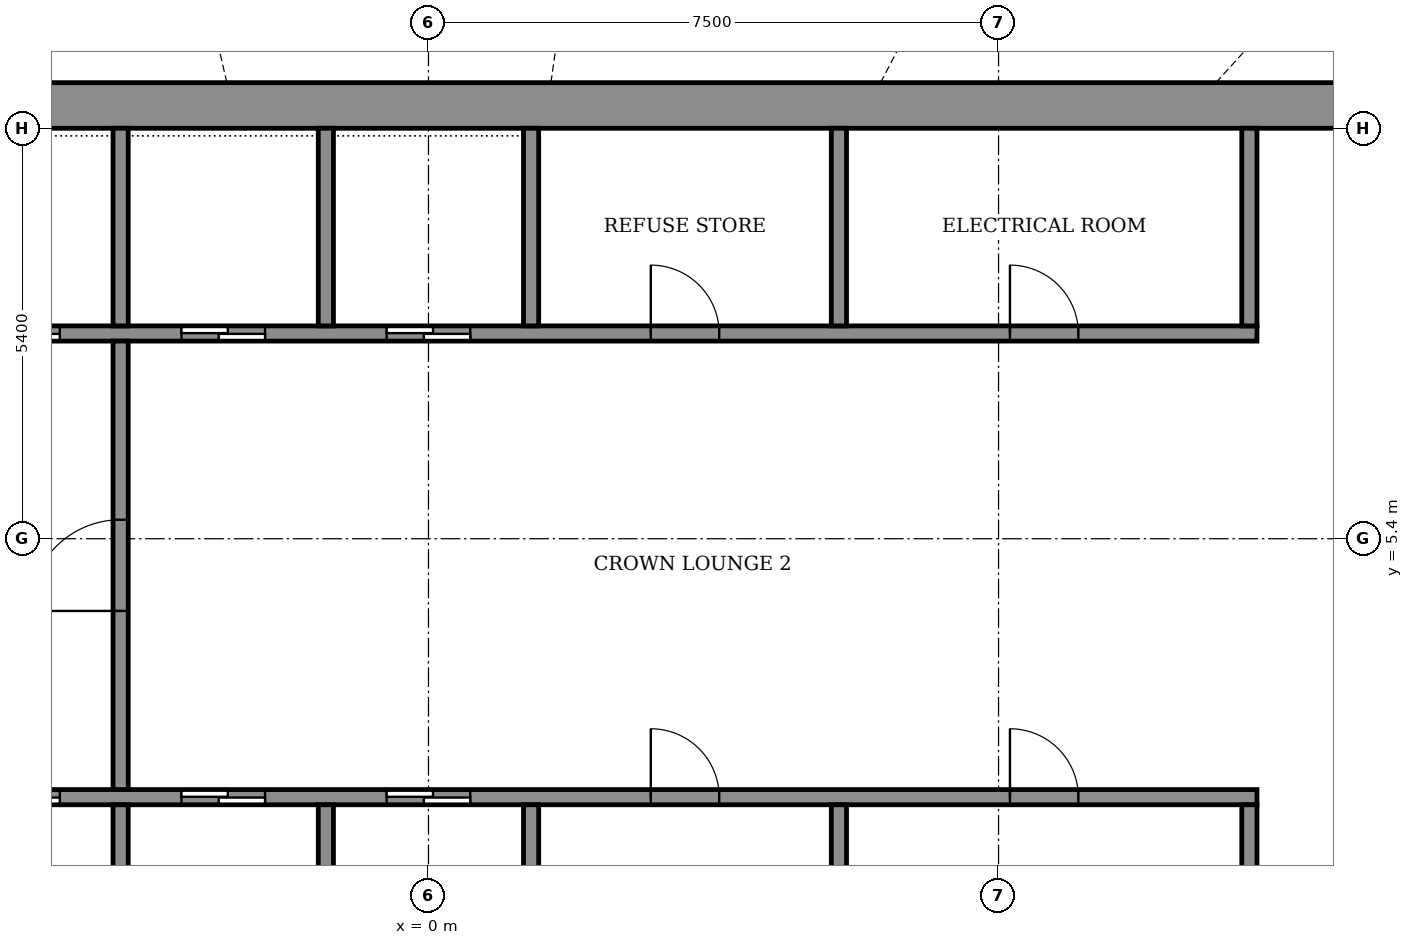
"""IFC4 building model, lengths in metres.
Left out: names, types, materials, properties, quantities, classifications, styles, units other than length and angle.
Written with IfcOpenShell. Run it as: python <this file> out.ifc"""

import sys

from ifc_helpers import new_model, si_unit, direction, frame, frame_2d, origin, place, context, subcontext, project, spatial, rectangle, extrude, element, fill, save


model = new_model("IFC4")
c1 = context("Model", 3, precision=1e-05, world=origin(), true_north=direction((0.0, 1.0)))
c2 = subcontext(c1, "Body", "Model", "MODEL_VIEW")
j1 = project(units=[si_unit("LENGTHUNIT", "METRE"), si_unit("PLANEANGLEUNIT", "RADIAN")], contexts=[c1])
p1 = place(None, origin())
s1 = spatial("IfcSite", under=j1, at=p1, CompositionType="ELEMENT")
p2 = place(p1, origin())
s2 = spatial("IfcBuilding", under=s1, at=p2, CompositionType="ELEMENT")
p3 = place(p2, frame((0.0, 0.0, 346.1)))
s3 = spatial("IfcBuildingStorey", under=s2, at=p3, CompositionType="ELEMENT", Elevation=346.1)
p4 = place(p3, frame((-14.4, 11.1, 0.0), z_axis=(0.0, 0.0, 1.0), x_axis=(1.0, 0.0, 0.0)))
e1 = element("IfcWall", 1, at=p4, inside=s3, PredefinedType="SHEAR", context=c2, shape_type="SweptSolid", body=[
    extrude(rectangle(XDim=28.8, YDim=0.6, at=frame_2d((14.4, 0.0))), origin(), (0.0, 0.0, 1.0), 4.6),
])
p5 = place(p3, frame((-10.9, 2.0, 0.0), z_axis=(0.0, 0.0, 1.0), x_axis=(1.0, 0.0, 0.0)))
e2 = element("IfcWall", 2, at=p5, inside=s3, PredefinedType="SHEAR", context=c2, shape_type="SweptSolid", body=[
    extrude(rectangle(XDim=21.8, YDim=0.2, at=frame_2d((10.9, 0.0))), origin(), (0.0, 0.0, 1.0), 4.05),
])
p6 = place(p5, frame((4.95, 0.0, 0.0)))
e3 = element("IfcOpeningElement", 3, at=p6, cuts=e2, PredefinedType="OPENING", context=c2, shape_type="SweptSolid", body=[
    extrude(rectangle(XDim=1.1, YDim=2.1, at=frame_2d((0.55, 1.05))), frame((0.0, 0.11, 0.0), z_axis=(0.0, -1.0, 0.0), x_axis=(1.0, 0.0, 0.0)), (0.0, 0.0, 1.0), 0.22),
])
p7 = place(p5, frame((7.65, 0.0, 0.0)))
e4 = element("IfcOpeningElement", 4, at=p7, cuts=e2, PredefinedType="OPENING", context=c2, shape_type="SweptSolid", body=[
    extrude(rectangle(XDim=1.1, YDim=2.1, at=frame_2d((0.55, 1.05))), frame((0.0, 0.11, 0.0), z_axis=(0.0, -1.0, 0.0), x_axis=(1.0, 0.0, 0.0)), (0.0, 0.0, 1.0), 0.22),
])
p8 = place(p5, frame((10.35, 0.0, 0.0)))
e5 = element("IfcOpeningElement", 5, at=p8, cuts=e2, PredefinedType="OPENING", context=c2, shape_type="SweptSolid", body=[
    extrude(rectangle(XDim=1.1, YDim=2.1, at=frame_2d((0.55, 1.05))), frame((0.0, 0.11, 0.0), z_axis=(0.0, -1.0, 0.0), x_axis=(1.0, 0.0, 0.0)), (0.0, 0.0, 1.0), 0.22),
])
p9 = place(p5, frame((1.675, 0.0, 0.0)))
e6 = element("IfcOpeningElement", 6, at=p9, cuts=e2, PredefinedType="OPENING", context=c2, shape_type="SweptSolid", body=[
    extrude(rectangle(XDim=0.9, YDim=2.1, at=frame_2d((0.45, 1.05))), frame((0.0, 0.11, 0.0), z_axis=(0.0, -1.0, 0.0), x_axis=(1.0, 0.0, 0.0)), (0.0, 0.0, 1.0), 0.22),
])
p10 = place(p5, frame((13.825, 0.0, 0.0)))
e7 = element("IfcOpeningElement", 7, at=p10, cuts=e2, PredefinedType="OPENING", context=c2, shape_type="SweptSolid", body=[
    extrude(rectangle(XDim=0.9, YDim=2.1, at=frame_2d((0.45, 1.05))), frame((0.0, 0.11, 0.0), z_axis=(0.0, -1.0, 0.0), x_axis=(1.0, 0.0, 0.0)), (0.0, 0.0, 1.0), 0.22),
])
p11 = place(p5, frame((18.55, 0.0, 0.0)))
e8 = element("IfcOpeningElement", 8, at=p11, cuts=e2, PredefinedType="OPENING", context=c2, shape_type="SweptSolid", body=[
    extrude(rectangle(XDim=0.9, YDim=2.1, at=frame_2d((0.45, 1.05))), frame((0.0, 0.11, 0.0), z_axis=(0.0, -1.0, 0.0), x_axis=(1.0, 0.0, 0.0)), (0.0, 0.0, 1.0), 0.22),
])
p12 = place(p3, frame((-10.9, 8.1, 0.0), z_axis=(0.0, 0.0, 1.0), x_axis=(1.0, 0.0, 0.0)))
e9 = element("IfcWall", 9, at=p12, inside=s3, PredefinedType="SHEAR", context=c2, shape_type="SweptSolid", body=[
    extrude(rectangle(XDim=21.8, YDim=0.2, at=frame_2d((10.9, 0.0))), origin(), (0.0, 0.0, 1.0), 4.05),
])
p13 = place(p12, frame((4.95, 0.0, 0.0)))
e10 = element("IfcOpeningElement", 10, at=p13, cuts=e9, PredefinedType="OPENING", context=c2, shape_type="SweptSolid", body=[
    extrude(rectangle(XDim=1.1, YDim=2.1, at=frame_2d((0.55, 1.05))), frame((0.0, 0.11, 0.0), z_axis=(0.0, -1.0, 0.0), x_axis=(1.0, 0.0, 0.0)), (0.0, 0.0, 1.0), 0.22),
])
p14 = place(p12, frame((7.65, 0.0, 0.0)))
e11 = element("IfcOpeningElement", 11, at=p14, cuts=e9, PredefinedType="OPENING", context=c2, shape_type="SweptSolid", body=[
    extrude(rectangle(XDim=1.1, YDim=2.1, at=frame_2d((0.55, 1.05))), frame((0.0, 0.11, 0.0), z_axis=(0.0, -1.0, 0.0), x_axis=(1.0, 0.0, 0.0)), (0.0, 0.0, 1.0), 0.22),
])
p15 = place(p12, frame((10.35, 0.0, 0.0)))
e12 = element("IfcOpeningElement", 12, at=p15, cuts=e9, PredefinedType="OPENING", context=c2, shape_type="SweptSolid", body=[
    extrude(rectangle(XDim=1.1, YDim=2.1, at=frame_2d((0.55, 1.05))), frame((0.0, 0.11, 0.0), z_axis=(0.0, -1.0, 0.0), x_axis=(1.0, 0.0, 0.0)), (0.0, 0.0, 1.0), 0.22),
])
p16 = place(p12, frame((1.675, 0.0, 0.0)))
e13 = element("IfcOpeningElement", 13, at=p16, cuts=e9, PredefinedType="OPENING", context=c2, shape_type="SweptSolid", body=[
    extrude(rectangle(XDim=0.9, YDim=2.1, at=frame_2d((0.45, 1.05))), frame((0.0, 0.11, 0.0), z_axis=(0.0, -1.0, 0.0), x_axis=(1.0, 0.0, 0.0)), (0.0, 0.0, 1.0), 0.22),
])
p17 = place(p12, frame((13.825, 0.0, 0.0)))
e14 = element("IfcOpeningElement", 14, at=p17, cuts=e9, PredefinedType="OPENING", context=c2, shape_type="SweptSolid", body=[
    extrude(rectangle(XDim=0.9, YDim=2.1, at=frame_2d((0.45, 1.05))), frame((0.0, 0.11, 0.0), z_axis=(0.0, -1.0, 0.0), x_axis=(1.0, 0.0, 0.0)), (0.0, 0.0, 1.0), 0.22),
])
p18 = place(p12, frame((18.55, 0.0, 0.0)))
e15 = element("IfcOpeningElement", 15, at=p18, cuts=e9, PredefinedType="OPENING", context=c2, shape_type="SweptSolid", body=[
    extrude(rectangle(XDim=0.9, YDim=2.1, at=frame_2d((0.45, 1.05))), frame((0.0, 0.11, 0.0), z_axis=(0.0, -1.0, 0.0), x_axis=(1.0, 0.0, 0.0)), (0.0, 0.0, 1.0), 0.22),
])
for number, where, z_axis, x_axis in (
    (16, (-4.05, -0.6, 0.0), (0.0, 0.0, 1.0), (0.0, 1.0, 0.0)),
    (17, (-1.35, -0.6, 0.0), (0.0, 0.0, 1.0), (0.0, 1.0, 0.0)),
    (18, (1.35, -0.6, 0.0), (0.0, 0.0, 1.0), (0.0, 1.0, 0.0)),
):
    element("IfcWall", number, at=place(p3, frame(where, z_axis=z_axis, x_axis=x_axis)), inside=s3, PredefinedType="SHEAR", context=c2, shape_type="SweptSolid", body=[
        extrude(rectangle(XDim=2.5, YDim=0.2, at=frame_2d((1.25, 0.0))), origin(), (0.0, 0.0, 1.0), 4.05),
    ])
for number, where, z_axis, x_axis in (
    (19, (5.4, -0.6, 0.0), (0.0, 0.0, 1.0), (0.0, 1.0, 0.0)),
    (20, (10.8, -0.6, 0.0), (0.0, 0.0, 1.0), (0.0, 1.0, 0.0)),
):
    element("IfcWall", number, at=place(p3, frame(where, z_axis=z_axis, x_axis=x_axis)), inside=s3, PredefinedType="STANDARD", context=c2, shape_type="SweptSolid", body=[
        extrude(rectangle(XDim=2.5, YDim=0.2, at=frame_2d((1.25, 0.0))), origin(), (0.0, 0.0, 1.0), 4.05),
    ])
for number, where, z_axis, x_axis in (
    (21, (-4.05, 8.2, 0.0), (0.0, 0.0, 1.0), (0.0, 1.0, 0.0)),
    (22, (-1.35, 8.2, 0.0), (0.0, 0.0, 1.0), (0.0, 1.0, 0.0)),
    (23, (1.35, 8.2, 0.0), (0.0, 0.0, 1.0), (0.0, 1.0, 0.0)),
):
    element("IfcWall", number, at=place(p3, frame(where, z_axis=z_axis, x_axis=x_axis)), inside=s3, PredefinedType="SHEAR", context=c2, shape_type="SweptSolid", body=[
        extrude(rectangle(XDim=2.6, YDim=0.2, at=frame_2d((1.3, 0.0))), origin(), (0.0, 0.0, 1.0), 4.05),
    ])
for number, where, z_axis, x_axis in (
    (24, (5.4, 8.2, 0.0), (0.0, 0.0, 1.0), (0.0, 1.0, 0.0)),
    (25, (10.8, 8.2, 0.0), (0.0, 0.0, 1.0), (0.0, 1.0, 0.0)),
):
    element("IfcWall", number, at=place(p3, frame(where, z_axis=z_axis, x_axis=x_axis)), inside=s3, PredefinedType="STANDARD", context=c2, shape_type="SweptSolid", body=[
        extrude(rectangle(XDim=2.6, YDim=0.2, at=frame_2d((1.3, 0.0))), origin(), (0.0, 0.0, 1.0), 4.05),
    ])
p19 = place(p3, frame((-4.05, 2.1, 0.0), z_axis=(0.0, 0.0, 1.0), x_axis=(0.0, 1.0, 0.0)))
e26 = element("IfcWall", 26, at=p19, inside=s3, PredefinedType="STANDARD", context=c2, shape_type="SweptSolid", body=[
    extrude(rectangle(XDim=5.9, YDim=0.2, at=frame_2d((2.95, 0.0))), origin(), (0.0, 0.0, 1.0), 4.05),
])
p20 = place(p19, frame((2.35, 0.0, 0.0)))
e27 = element("IfcOpeningElement", 27, at=p20, cuts=e26, PredefinedType="OPENING", context=c2, shape_type="SweptSolid", body=[
    extrude(rectangle(XDim=1.2, YDim=2.1, at=frame_2d((0.6, 1.05))), frame((0.0, 0.11, 0.0), z_axis=(0.0, -1.0, 0.0), x_axis=(1.0, 0.0, 0.0)), (0.0, 0.0, 1.0), 0.22),
])
p21 = place(p6, origin())
e28 = element("IfcDoor", 28, at=p21, inside=s3, OperationType="SLIDING_TO_LEFT", PredefinedType="DOOR", context=c2, shape_type="SweptSolid", body=[
    extrude(rectangle(XDim=1.1, YDim=2.1, at=frame_2d((0.55, 1.05))), frame((0.0, 0.025, 0.0), z_axis=(0.0, -1.0, 0.0), x_axis=(1.0, 0.0, 0.0)), (0.0, 0.0, 1.0), 0.05),
])
fill(e3, e28)
p22 = place(p7, origin())
e29 = element("IfcDoor", 29, at=p22, inside=s3, OperationType="SLIDING_TO_LEFT", PredefinedType="DOOR", context=c2, shape_type="SweptSolid", body=[
    extrude(rectangle(XDim=1.1, YDim=2.1, at=frame_2d((0.55, 1.05))), frame((0.0, 0.025, 0.0), z_axis=(0.0, -1.0, 0.0), x_axis=(1.0, 0.0, 0.0)), (0.0, 0.0, 1.0), 0.05),
])
fill(e4, e29)
p23 = place(p8, origin())
e30 = element("IfcDoor", 30, at=p23, inside=s3, OperationType="SLIDING_TO_LEFT", PredefinedType="DOOR", context=c2, shape_type="SweptSolid", body=[
    extrude(rectangle(XDim=1.1, YDim=2.1, at=frame_2d((0.55, 1.05))), frame((0.0, 0.025, 0.0), z_axis=(0.0, -1.0, 0.0), x_axis=(1.0, 0.0, 0.0)), (0.0, 0.0, 1.0), 0.05),
])
fill(e5, e30)
p24 = place(p13, origin())
e31 = element("IfcDoor", 31, at=p24, inside=s3, OperationType="SLIDING_TO_LEFT", PredefinedType="DOOR", context=c2, shape_type="SweptSolid", body=[
    extrude(rectangle(XDim=1.1, YDim=2.1, at=frame_2d((0.55, 1.05))), frame((0.0, 0.025, 0.0), z_axis=(0.0, -1.0, 0.0), x_axis=(1.0, 0.0, 0.0)), (0.0, 0.0, 1.0), 0.05),
])
fill(e10, e31)
p25 = place(p14, origin())
e32 = element("IfcDoor", 32, at=p25, inside=s3, OperationType="SLIDING_TO_LEFT", PredefinedType="DOOR", context=c2, shape_type="SweptSolid", body=[
    extrude(rectangle(XDim=1.1, YDim=2.1, at=frame_2d((0.55, 1.05))), frame((0.0, 0.025, 0.0), z_axis=(0.0, -1.0, 0.0), x_axis=(1.0, 0.0, 0.0)), (0.0, 0.0, 1.0), 0.05),
])
fill(e11, e32)
p26 = place(p15, origin())
e33 = element("IfcDoor", 33, at=p26, inside=s3, OperationType="SLIDING_TO_LEFT", PredefinedType="DOOR", context=c2, shape_type="SweptSolid", body=[
    extrude(rectangle(XDim=1.1, YDim=2.1, at=frame_2d((0.55, 1.05))), frame((0.0, 0.025, 0.0), z_axis=(0.0, -1.0, 0.0), x_axis=(1.0, 0.0, 0.0)), (0.0, 0.0, 1.0), 0.05),
])
fill(e12, e33)
p27 = place(p10, origin())
e34 = element("IfcDoor", 34, at=p27, inside=s3, OperationType="SINGLE_SWING_RIGHT", PredefinedType="DOOR", context=c2, shape_type="SweptSolid", body=[
    extrude(rectangle(XDim=0.9, YDim=2.1, at=frame_2d((0.45, 1.05))), frame((0.0, 0.025, 0.0), z_axis=(0.0, -1.0, 0.0), x_axis=(1.0, 0.0, 0.0)), (0.0, 0.0, 1.0), 0.05),
])
fill(e7, e34)
p28 = place(p11, origin())
e35 = element("IfcDoor", 35, at=p28, inside=s3, OperationType="SINGLE_SWING_RIGHT", PredefinedType="DOOR", context=c2, shape_type="SweptSolid", body=[
    extrude(rectangle(XDim=0.9, YDim=2.1, at=frame_2d((0.45, 1.05))), frame((0.0, 0.025, 0.0), z_axis=(0.0, -1.0, 0.0), x_axis=(1.0, 0.0, 0.0)), (0.0, 0.0, 1.0), 0.05),
])
fill(e8, e35)
p29 = place(p17, origin())
e36 = element("IfcDoor", 36, at=p29, inside=s3, OperationType="SINGLE_SWING_RIGHT", PredefinedType="DOOR", context=c2, shape_type="SweptSolid", body=[
    extrude(rectangle(XDim=0.9, YDim=2.1, at=frame_2d((0.45, 1.05))), frame((0.0, 0.025, 0.0), z_axis=(0.0, -1.0, 0.0), x_axis=(1.0, 0.0, 0.0)), (0.0, 0.0, 1.0), 0.05),
])
fill(e14, e36)
p30 = place(p18, origin())
e37 = element("IfcDoor", 37, at=p30, inside=s3, OperationType="SINGLE_SWING_LEFT", PredefinedType="DOOR", context=c2, shape_type="SweptSolid", body=[
    extrude(rectangle(XDim=0.9, YDim=2.1, at=frame_2d((0.45, 1.05))), frame((0.0, 0.025, 0.0), z_axis=(0.0, -1.0, 0.0), x_axis=(1.0, 0.0, 0.0)), (0.0, 0.0, 1.0), 0.05),
])
fill(e15, e37)
p31 = place(p20, origin())
e38 = element("IfcDoor", 38, at=p31, inside=s3, OperationType="SINGLE_SWING_LEFT", PredefinedType="DOOR", context=c2, shape_type="SweptSolid", body=[
    extrude(rectangle(XDim=1.2, YDim=2.1, at=frame_2d((0.6, 1.05))), frame((0.0, 0.025, 0.0), z_axis=(0.0, -1.0, 0.0), x_axis=(1.0, 0.0, 0.0)), (0.0, 0.0, 1.0), 0.05),
])
fill(e27, e38)
save(model, sys.argv[1])
